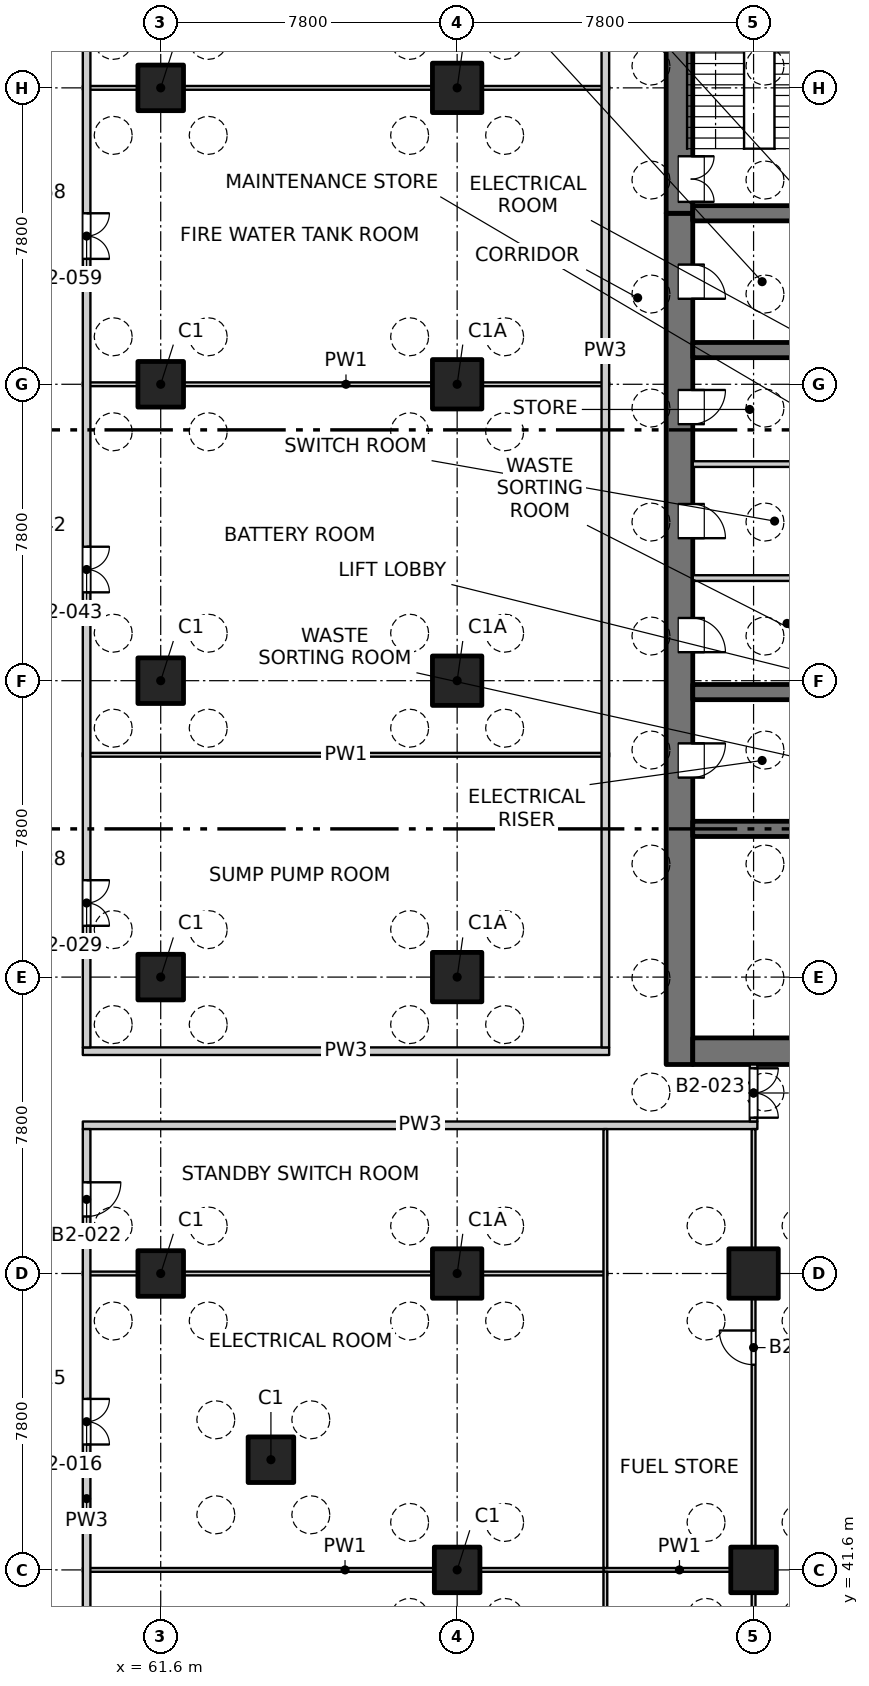
"""IFC4 building model, lengths in metres.
Left out: names, types, materials, properties, quantities, classifications, styles, units other than length and angle.
Written with IfcOpenShell. Run it as: python <this file> out.ifc"""

import sys

from ifc_helpers import new_model, si_unit, direction, frame, frame_2d, origin, origin_2d, place, context, subcontext, project, spatial, rectangle, extrude, element, fill, save


model = new_model("IFC4")
c1 = context("Model", 3, precision=1e-05, world=origin(), true_north=direction((0.0, 1.0)))
c2 = subcontext(c1, "Body", "Model", "MODEL_VIEW")
j1 = project(units=[si_unit("LENGTHUNIT", "METRE"), si_unit("PLANEANGLEUNIT", "RADIAN")], contexts=[c1])
p1 = place(None, origin())
s1 = spatial("IfcSite", under=j1, at=p1, CompositionType="ELEMENT")
p2 = place(p1, origin())
s2 = spatial("IfcBuilding", under=s1, at=p2, CompositionType="ELEMENT")
p3 = place(p2, frame((0.0, 0.0, -9.0)))
s3 = spatial("IfcBuildingStorey", under=s2, at=p3, CompositionType="ELEMENT", Elevation=-9.0)
for number, where, z_axis, x_axis in (
    (1, (64.5, 44.5, -0.5), (0.0, 0.0, 1.0), (1.0, 0.0, 0.0)),
    (2, (61.6, 49.4, -0.5), (0.0, 0.0, 1.0), (1.0, 0.0, 0.0)),
    (3, (69.4, 41.6, -0.5), (0.0, 0.0, 1.0), (1.0, 0.0, 0.0)),
    (4, (61.6, 57.2, -0.5), (0.0, 0.0, 1.0), (1.0, 0.0, 0.0)),
    (5, (77.2, 41.6, -0.5), (0.0, 0.0, 1.0), (1.0, 0.0, 0.0)),
    (6, (61.6, 65.0, -0.5), (0.0, 0.0, 1.0), (1.0, 0.0, 0.0)),
    (7, (61.6, 72.8, -0.5), (0.0, 0.0, 1.0), (1.0, 0.0, 0.0)),
    (8, (61.6, 80.6, -0.5), (0.0, 0.0, 1.0), (1.0, 0.0, 0.0)),
):
    element("IfcColumn", number, at=place(p3, frame(where, z_axis=z_axis, x_axis=x_axis)), inside=s3, PredefinedType="COLUMN", context=c2, shape_type="SweptSolid", body=[
        extrude(rectangle(XDim=1.2, YDim=1.2, at=origin_2d()), origin(), (0.0, 0.0, 1.0), 4.65),
    ])
for number, where, z_axis, x_axis in (
    (9, (69.4, 49.4, -0.5), (0.0, 0.0, 1.0), (1.0, 0.0, 0.0)),
    (10, (69.4, 57.2, -0.5), (0.0, 0.0, 1.0), (1.0, 0.0, 0.0)),
    (11, (69.4, 65.0, -0.5), (0.0, 0.0, 1.0), (1.0, 0.0, 0.0)),
    (12, (69.4, 72.8, -0.5), (0.0, 0.0, 1.0), (1.0, 0.0, 0.0)),
    (13, (69.4, 80.6, -0.5), (0.0, 0.0, 1.0), (1.0, 0.0, 0.0)),
    (14, (77.2, 49.4, -0.5), (0.0, 0.0, 1.0), (1.0, 0.0, 0.0)),
):
    element("IfcColumn", number, at=place(p3, frame(where, z_axis=z_axis, x_axis=x_axis)), inside=s3, PredefinedType="COLUMN", context=c2, shape_type="SweptSolid", body=[
        extrude(rectangle(XDim=1.3, YDim=1.3, at=origin_2d()), origin(), (0.0, 0.0, 1.0), 4.65),
    ])
p4 = place(p3, frame((75.25, 54.9, -0.5), z_axis=(0.0, 0.0, 1.0), x_axis=(0.0, 1.0, 0.0)))
e15 = element("IfcWall", 15, at=p4, inside=s3, PredefinedType="SOLIDWALL", context=c2, shape_type="SweptSolid", body=[
    extrude(rectangle(XDim=22.4, YDim=0.7, at=frame_2d((11.2, 0.0))), origin(), (0.0, 0.0, 1.0), 4.65),
])
p5 = place(p4, frame((7.55, 0.0, 0.5)))
e16 = element("IfcOpeningElement", 16, at=p5, cuts=e15, PredefinedType="OPENING", context=c2, shape_type="SweptSolid", body=[
    extrude(rectangle(XDim=0.9, YDim=2.1, at=frame_2d((0.45, 1.05))), frame((0.0, 0.36, 0.0), z_axis=(0.0, -1.0, 0.0), x_axis=(1.0, 0.0, 0.0)), (0.0, 0.0, 1.0), 0.72),
])
p6 = place(p4, frame((10.85, 0.0, 0.5)))
e17 = element("IfcOpeningElement", 17, at=p6, cuts=e15, PredefinedType="OPENING", context=c2, shape_type="SweptSolid", body=[
    extrude(rectangle(XDim=0.9, YDim=2.1, at=frame_2d((0.45, 1.05))), frame((0.0, 0.36, 0.0), z_axis=(0.0, -1.0, 0.0), x_axis=(1.0, 0.0, 0.0)), (0.0, 0.0, 1.0), 0.72),
])
p7 = place(p4, frame((13.85, 0.0, 0.5)))
e18 = element("IfcOpeningElement", 18, at=p7, cuts=e15, PredefinedType="OPENING", context=c2, shape_type="SweptSolid", body=[
    extrude(rectangle(XDim=0.9, YDim=2.1, at=frame_2d((0.45, 1.05))), frame((0.0, 0.36, 0.0), z_axis=(0.0, -1.0, 0.0), x_axis=(1.0, 0.0, 0.0)), (0.0, 0.0, 1.0), 0.72),
])
p8 = place(p4, frame((16.85, 0.0, 0.5)))
e19 = element("IfcOpeningElement", 19, at=p8, cuts=e15, PredefinedType="OPENING", context=c2, shape_type="SweptSolid", body=[
    extrude(rectangle(XDim=0.9, YDim=2.1, at=frame_2d((0.45, 1.05))), frame((0.0, 0.36, 0.0), z_axis=(0.0, -1.0, 0.0), x_axis=(1.0, 0.0, 0.0)), (0.0, 0.0, 1.0), 0.72),
])
p9 = place(p4, frame((20.15, 0.0, 0.5)))
e20 = element("IfcOpeningElement", 20, at=p9, cuts=e15, PredefinedType="OPENING", context=c2, shape_type="SweptSolid", body=[
    extrude(rectangle(XDim=0.9, YDim=2.1, at=frame_2d((0.45, 1.05))), frame((0.0, 0.36, 0.0), z_axis=(0.0, -1.0, 0.0), x_axis=(1.0, 0.0, 0.0)), (0.0, 0.0, 1.0), 0.72),
])
p10 = place(p3, frame((75.25, 77.3, -0.5), z_axis=(0.0, 0.0, 1.0), x_axis=(0.0, 1.0, 0.0)))
e21 = element("IfcWall", 21, at=p10, inside=s3, PredefinedType="SOLIDWALL", context=c2, shape_type="SweptSolid", body=[
    extrude(rectangle(XDim=7.55, YDim=0.7, at=frame_2d((3.775, 0.0))), origin(), (0.0, 0.0, 1.0), 4.65),
])
p11 = place(p10, frame((0.3, 0.0, 0.5)))
e22 = element("IfcOpeningElement", 22, at=p11, cuts=e21, PredefinedType="OPENING", context=c2, shape_type="SweptSolid", body=[
    extrude(rectangle(XDim=1.2, YDim=2.1, at=frame_2d((0.6, 1.05))), frame((0.0, 0.36, 0.0), z_axis=(0.0, -1.0, 0.0), x_axis=(1.0, 0.0, 0.0)), (0.0, 0.0, 1.0), 0.72),
])
p12 = place(p3, frame((75.6, 55.25, -0.5), z_axis=(0.0, 0.0, 1.0), x_axis=(1.0, 0.0, 0.0)))
e23 = element("IfcWall", 23, at=p12, inside=s3, PredefinedType="SOLIDWALL", context=c2, shape_type="SweptSolid", body=[
    extrude(rectangle(XDim=18.8, YDim=0.7, at=frame_2d((9.4, 0.0))), origin(), (0.0, 0.0, 1.0), 4.65),
])
p13 = place(p12, frame((8.65, 0.0, 0.5)))
e24 = element("IfcOpeningElement", 24, at=p13, cuts=e23, PredefinedType="OPENING", context=c2, shape_type="SweptSolid", body=[
    extrude(rectangle(XDim=1.5, YDim=2.1, at=frame_2d((0.75, 1.05))), frame((0.0, 0.36, 0.0), z_axis=(0.0, -1.0, 0.0), x_axis=(1.0, 0.0, 0.0)), (0.0, 0.0, 1.0), 0.72),
])
for number, where, z_axis, x_axis in (
    (25, (75.6, 61.1, -0.5), (0.0, 0.0, 1.0), (1.0, 0.0, 0.0)),
    (26, (75.6, 64.7, -0.5), (0.0, 0.0, 1.0), (1.0, 0.0, 0.0)),
    (27, (75.6, 73.7, -0.5), (0.0, 0.0, 1.0), (1.0, 0.0, 0.0)),
    (28, (75.6, 77.3, -0.5), (0.0, 0.0, 1.0), (1.0, 0.0, 0.0)),
):
    element("IfcWall", number, at=place(p3, frame(where, z_axis=z_axis, x_axis=x_axis)), inside=s3, PredefinedType="SOLIDWALL", context=c2, shape_type="SweptSolid", body=[
        extrude(rectangle(XDim=3.65, YDim=0.4, at=frame_2d((1.825, 0.0))), origin(), (0.0, 0.0, 1.0), 4.65),
    ])
p14 = place(p3, frame((59.55, 41.6, 0.0), z_axis=(0.0, 0.0, 1.0), x_axis=(1.0, 0.0, 0.0)))
e29 = element("IfcWall", 29, at=p14, inside=s3, PredefinedType="PARTITIONING", context=c2, shape_type="SweptSolid", body=[
    extrude(rectangle(XDim=13.8, YDim=0.1, at=frame_2d((6.9, 0.0))), origin(), (0.0, 0.0, 1.0), 4.15),
])
p15 = place(p3, frame((73.25, 41.6, 0.0), z_axis=(0.0, 0.0, 1.0), x_axis=(1.0, 0.0, 0.0)))
e30 = element("IfcWall", 30, at=p15, inside=s3, PredefinedType="PARTITIONING", context=c2, shape_type="SweptSolid", body=[
    extrude(rectangle(XDim=4.0, YDim=0.1, at=frame_2d((2.0, 0.0))), origin(), (0.0, 0.0, 1.0), 4.15),
])
p16 = place(p3, frame((59.55, 49.4, 0.0), z_axis=(0.0, 0.0, 1.0), x_axis=(1.0, 0.0, 0.0)))
e31 = element("IfcWall", 31, at=p16, inside=s3, PredefinedType="PARTITIONING", context=c2, shape_type="SweptSolid", body=[
    extrude(rectangle(XDim=13.8, YDim=0.1, at=frame_2d((6.9, 0.0))), origin(), (0.0, 0.0, 1.0), 4.15),
])
p17 = place(p3, frame((59.55, 53.3, 0.0), z_axis=(0.0, 0.0, 1.0), x_axis=(1.0, 0.0, 0.0)))
e32 = element("IfcWall", 32, at=p17, inside=s3, PredefinedType="PARTITIONING", context=c2, shape_type="SweptSolid", body=[
    extrude(rectangle(XDim=17.75, YDim=0.2, at=frame_2d((8.875, 0.0))), origin(), (0.0, 0.0, 1.0), 4.15),
])
p18 = place(p3, frame((59.55, 55.25, 0.0), z_axis=(0.0, 0.0, 1.0), x_axis=(1.0, 0.0, 0.0)))
e33 = element("IfcWall", 33, at=p18, inside=s3, PredefinedType="PARTITIONING", context=c2, shape_type="SweptSolid", body=[
    extrude(rectangle(XDim=13.85, YDim=0.2, at=frame_2d((6.925, 0.0))), origin(), (0.0, 0.0, 1.0), 4.15),
])
p19 = place(p3, frame((59.55, 63.05, 0.0), z_axis=(0.0, 0.0, 1.0), x_axis=(1.0, 0.0, 0.0)))
e34 = element("IfcWall", 34, at=p19, inside=s3, PredefinedType="PARTITIONING", context=c2, shape_type="SweptSolid", body=[
    extrude(rectangle(XDim=13.85, YDim=0.1, at=frame_2d((6.925, 0.0))), origin(), (0.0, 0.0, 1.0), 4.15),
])
for number, where, z_axis, x_axis in (
    (35, (75.6, 67.7, 0.0), (0.0, 0.0, 1.0), (1.0, 0.0, 0.0)),
    (36, (75.6, 70.7, 0.0), (0.0, 0.0, 1.0), (1.0, 0.0, 0.0)),
):
    element("IfcWall", number, at=place(p3, frame(where, z_axis=z_axis, x_axis=x_axis)), inside=s3, PredefinedType="PARTITIONING", context=c2, shape_type="SweptSolid", body=[
        extrude(rectangle(XDim=3.65, YDim=0.15, at=frame_2d((1.825, 0.0))), origin(), (0.0, 0.0, 1.0), 4.15),
    ])
for number, where, z_axis, x_axis in (
    (37, (59.55, 72.8, 0.0), (0.0, 0.0, 1.0), (1.0, 0.0, 0.0)),
    (38, (59.55, 80.6, 0.0), (0.0, 0.0, 1.0), (1.0, 0.0, 0.0)),
):
    element("IfcWall", number, at=place(p3, frame(where, z_axis=z_axis, x_axis=x_axis)), inside=s3, PredefinedType="PARTITIONING", context=c2, shape_type="SweptSolid", body=[
        extrude(rectangle(XDim=13.85, YDim=0.1, at=frame_2d((6.925, 0.0))), origin(), (0.0, 0.0, 1.0), 4.15),
    ])
p20 = place(p3, frame((59.65, 33.75, 0.0), z_axis=(0.0, 0.0, 1.0), x_axis=(0.0, 1.0, 0.0)))
e39 = element("IfcWall", 39, at=p20, inside=s3, PredefinedType="PARTITIONING", context=c2, shape_type="SweptSolid", body=[
    extrude(rectangle(XDim=19.45, YDim=0.2, at=frame_2d((9.725, 0.0))), origin(), (0.0, 0.0, 1.0), 4.15),
])
p21 = place(p20, frame((3.35, 0.0, 0.0)))
e40 = element("IfcOpeningElement", 40, at=p21, cuts=e39, PredefinedType="OPENING", context=c2, shape_type="SweptSolid", body=[
    extrude(rectangle(XDim=1.2, YDim=2.1, at=frame_2d((0.6, 1.05))), frame((0.0, 0.11, 0.0), z_axis=(0.0, -1.0, 0.0), x_axis=(1.0, 0.0, 0.0)), (0.0, 0.0, 1.0), 0.22),
])
p22 = place(p20, frame((11.15, 0.0, 0.0)))
e41 = element("IfcOpeningElement", 41, at=p22, cuts=e39, PredefinedType="OPENING", context=c2, shape_type="SweptSolid", body=[
    extrude(rectangle(XDim=1.2, YDim=2.1, at=frame_2d((0.6, 1.05))), frame((0.0, 0.11, 0.0), z_axis=(0.0, -1.0, 0.0), x_axis=(1.0, 0.0, 0.0)), (0.0, 0.0, 1.0), 0.22),
])
p23 = place(p20, frame((17.15, 0.0, 0.0)))
e42 = element("IfcOpeningElement", 42, at=p23, cuts=e39, PredefinedType="OPENING", context=c2, shape_type="SweptSolid", body=[
    extrude(rectangle(XDim=0.9, YDim=2.1, at=frame_2d((0.45, 1.05))), frame((0.0, 0.11, 0.0), z_axis=(0.0, -1.0, 0.0), x_axis=(1.0, 0.0, 0.0)), (0.0, 0.0, 1.0), 0.22),
])
p24 = place(p3, frame((59.65, 55.35, 0.0), z_axis=(0.0, 0.0, 1.0), x_axis=(0.0, 1.0, 0.0)))
e43 = element("IfcWall", 43, at=p24, inside=s3, PredefinedType="PARTITIONING", context=c2, shape_type="SweptSolid", body=[
    extrude(rectangle(XDim=36.65, YDim=0.2, at=frame_2d((18.325, 0.0))), origin(), (0.0, 0.0, 1.0), 4.15),
])
p25 = place(p24, frame((3.2, 0.0, 0.0)))
e44 = element("IfcOpeningElement", 44, at=p25, cuts=e43, PredefinedType="OPENING", context=c2, shape_type="SweptSolid", body=[
    extrude(rectangle(XDim=1.2, YDim=2.1, at=frame_2d((0.6, 1.05))), frame((0.0, 0.11, 0.0), z_axis=(0.0, -1.0, 0.0), x_axis=(1.0, 0.0, 0.0)), (0.0, 0.0, 1.0), 0.22),
])
p26 = place(p24, frame((11.975, 0.0, 0.0)))
e45 = element("IfcOpeningElement", 45, at=p26, cuts=e43, PredefinedType="OPENING", context=c2, shape_type="SweptSolid", body=[
    extrude(rectangle(XDim=1.2, YDim=2.1, at=frame_2d((0.6, 1.05))), frame((0.0, 0.11, 0.0), z_axis=(0.0, -1.0, 0.0), x_axis=(1.0, 0.0, 0.0)), (0.0, 0.0, 1.0), 0.22),
])
p27 = place(p24, frame((20.75, 0.0, 0.0)))
e46 = element("IfcOpeningElement", 46, at=p27, cuts=e43, PredefinedType="OPENING", context=c2, shape_type="SweptSolid", body=[
    extrude(rectangle(XDim=1.2, YDim=2.1, at=frame_2d((0.6, 1.05))), frame((0.0, 0.11, 0.0), z_axis=(0.0, -1.0, 0.0), x_axis=(1.0, 0.0, 0.0)), (0.0, 0.0, 1.0), 0.22),
])
p28 = place(p24, frame((30.5, 0.0, 0.0)))
e47 = element("IfcOpeningElement", 47, at=p28, cuts=e43, PredefinedType="OPENING", context=c2, shape_type="SweptSolid", body=[
    extrude(rectangle(XDim=1.2, YDim=2.1, at=frame_2d((0.6, 1.05))), frame((0.0, 0.11, 0.0), z_axis=(0.0, -1.0, 0.0), x_axis=(1.0, 0.0, 0.0)), (0.0, 0.0, 1.0), 0.22),
])
p29 = place(p3, frame((73.3, 33.85, 0.0), z_axis=(0.0, 0.0, 1.0), x_axis=(0.0, 1.0, 0.0)))
e48 = element("IfcWall", 48, at=p29, inside=s3, PredefinedType="PARTITIONING", context=c2, shape_type="SweptSolid", body=[
    extrude(rectangle(XDim=7.7, YDim=0.1, at=frame_2d((3.85, 0.0))), origin(), (0.0, 0.0, 1.0), 4.15),
])
p30 = place(p3, frame((73.3, 41.65, 0.0), z_axis=(0.0, 0.0, 1.0), x_axis=(0.0, 1.0, 0.0)))
e49 = element("IfcWall", 49, at=p30, inside=s3, PredefinedType="PARTITIONING", context=c2, shape_type="SweptSolid", body=[
    extrude(rectangle(XDim=11.55, YDim=0.1, at=frame_2d((5.775, 0.0))), origin(), (0.0, 0.0, 1.0), 4.15),
])
p31 = place(p3, frame((73.3, 55.35, 0.0), z_axis=(0.0, 0.0, 1.0), x_axis=(0.0, 1.0, 0.0)))
e50 = element("IfcWall", 50, at=p31, inside=s3, PredefinedType="PARTITIONING", context=c2, shape_type="SweptSolid", body=[
    extrude(rectangle(XDim=36.65, YDim=0.2, at=frame_2d((18.325, 0.0))), origin(), (0.0, 0.0, 1.0), 4.15),
])
p32 = place(p3, frame((77.2, 22.4, 0.0), z_axis=(0.0, 0.0, 1.0), x_axis=(0.0, 1.0, 0.0)))
e51 = element("IfcWall", 51, at=p32, inside=s3, PredefinedType="PARTITIONING", context=c2, shape_type="SweptSolid", body=[
    extrude(rectangle(XDim=19.15, YDim=0.1, at=frame_2d((9.575, 0.0))), origin(), (0.0, 0.0, 1.0), 4.15),
])
p33 = place(p32, frame((9.65, 0.0, 0.0)))
e52 = element("IfcOpeningElement", 52, at=p33, cuts=e51, PredefinedType="OPENING", context=c2, shape_type="SweptSolid", body=[
    extrude(rectangle(XDim=0.9, YDim=2.1, at=frame_2d((0.45, 1.05))), frame((0.0, 0.06, 0.0), z_axis=(0.0, -1.0, 0.0), x_axis=(1.0, 0.0, 0.0)), (0.0, 0.0, 1.0), 0.12),
])
p34 = place(p32, frame((14.85, 0.0, 0.0)))
e53 = element("IfcOpeningElement", 53, at=p34, cuts=e51, PredefinedType="OPENING", context=c2, shape_type="SweptSolid", body=[
    extrude(rectangle(XDim=0.9, YDim=2.1, at=frame_2d((0.45, 1.05))), frame((0.0, 0.06, 0.0), z_axis=(0.0, -1.0, 0.0), x_axis=(1.0, 0.0, 0.0)), (0.0, 0.0, 1.0), 0.12),
])
p35 = place(p3, frame((77.2, 41.65, 0.0), z_axis=(0.0, 0.0, 1.0), x_axis=(0.0, 1.0, 0.0)))
e54 = element("IfcWall", 54, at=p35, inside=s3, PredefinedType="PARTITIONING", context=c2, shape_type="SweptSolid", body=[
    extrude(rectangle(XDim=11.55, YDim=0.1, at=frame_2d((5.775, 0.0))), origin(), (0.0, 0.0, 1.0), 4.15),
])
p36 = place(p35, frame((5.35, 0.0, 0.0)))
e55 = element("IfcOpeningElement", 55, at=p36, cuts=e54, PredefinedType="OPENING", context=c2, shape_type="SweptSolid", body=[
    extrude(rectangle(XDim=0.9, YDim=2.1, at=frame_2d((0.45, 1.05))), frame((0.0, 0.06, 0.0), z_axis=(0.0, -1.0, 0.0), x_axis=(1.0, 0.0, 0.0)), (0.0, 0.0, 1.0), 0.12),
])
p37 = place(p3, frame((77.2, 53.4, 0.0), z_axis=(0.0, 0.0, 1.0), x_axis=(0.0, 1.0, 0.0)))
e56 = element("IfcWall", 56, at=p37, inside=s3, PredefinedType="PARTITIONING", context=c2, shape_type="SweptSolid", body=[
    extrude(rectangle(XDim=1.5, YDim=0.2, at=frame_2d((0.75, 0.0))), origin(), (0.0, 0.0, 1.0), 4.15),
])
p38 = place(p37, frame((0.1, 0.0, 0.0)))
e57 = element("IfcOpeningElement", 57, at=p38, cuts=e56, PredefinedType="OPENING", context=c2, shape_type="SweptSolid", body=[
    extrude(rectangle(XDim=1.3, YDim=2.1, at=frame_2d((0.65, 1.05))), frame((0.0, 0.11, 0.0), z_axis=(0.0, -1.0, 0.0), x_axis=(1.0, 0.0, 0.0)), (0.0, 0.0, 1.0), 0.22),
])
p39 = place(p22, origin())
e58 = element("IfcDoor", 58, at=p39, inside=s3, OperationType="DOUBLE_DOOR_SINGLE_SWING", PredefinedType="DOOR", context=c2, shape_type="SweptSolid", body=[
    extrude(rectangle(XDim=1.2, YDim=2.1, at=frame_2d((0.6, 1.05))), frame((0.0, 0.025, 0.0), z_axis=(0.0, -1.0, 0.0), x_axis=(1.0, 0.0, 0.0)), (0.0, 0.0, 1.0), 0.05),
])
fill(e41, e58)
p40 = place(p36, origin())
e59 = element("IfcDoor", 59, at=p40, inside=s3, OperationType="SINGLE_SWING_RIGHT", PredefinedType="DOOR", context=c2, shape_type="SweptSolid", body=[
    extrude(rectangle(XDim=0.9, YDim=2.1, at=frame_2d((0.45, 1.05))), frame((0.0, 0.025, 0.0), z_axis=(0.0, -1.0, 0.0), x_axis=(1.0, 0.0, 0.0)), (0.0, 0.0, 1.0), 0.05),
])
fill(e55, e59)
p41 = place(p23, origin())
e60 = element("IfcDoor", 60, at=p41, inside=s3, OperationType="SINGLE_SWING_LEFT", PredefinedType="DOOR", context=c2, shape_type="SweptSolid", body=[
    extrude(rectangle(XDim=0.9, YDim=2.1, at=frame_2d((0.45, 1.05))), frame((0.0, 0.025, 0.0), z_axis=(0.0, -1.0, 0.0), x_axis=(1.0, 0.0, 0.0)), (0.0, 0.0, 1.0), 0.05),
])
fill(e42, e60)
p42 = place(p38, origin())
e61 = element("IfcDoor", 61, at=p42, inside=s3, OperationType="DOUBLE_DOOR_SINGLE_SWING", PredefinedType="DOOR", context=c2, shape_type="SweptSolid", body=[
    extrude(rectangle(XDim=1.3, YDim=2.1, at=frame_2d((0.65, 1.05))), frame((0.0, 0.025, 0.0), z_axis=(0.0, -1.0, 0.0), x_axis=(1.0, 0.0, 0.0)), (0.0, 0.0, 1.0), 0.05),
])
fill(e57, e61)
p43 = place(p25, origin())
e62 = element("IfcDoor", 62, at=p43, inside=s3, OperationType="DOUBLE_DOOR_SINGLE_SWING", PredefinedType="DOOR", context=c2, shape_type="SweptSolid", body=[
    extrude(rectangle(XDim=1.2, YDim=2.1, at=frame_2d((0.6, 1.05))), frame((0.0, 0.025, 0.0), z_axis=(0.0, -1.0, 0.0), x_axis=(1.0, 0.0, 0.0)), (0.0, 0.0, 1.0), 0.05),
])
fill(e44, e62)
p44 = place(p5, origin())
e63 = element("IfcDoor", 63, at=p44, inside=s3, OperationType="SINGLE_SWING_LEFT", PredefinedType="DOOR", context=c2, shape_type="SweptSolid", body=[
    extrude(rectangle(XDim=0.9, YDim=2.1, at=frame_2d((0.45, 1.05))), frame((0.0, -0.285, 0.0), z_axis=(0.0, -1.0, 0.0), x_axis=(1.0, 0.0, 0.0)), (0.0, 0.0, 1.0), 0.05),
])
fill(e16, e63)
p45 = place(p6, origin())
e64 = element("IfcDoor", 64, at=p45, inside=s3, OperationType="SINGLE_SWING_RIGHT", PredefinedType="DOOR", context=c2, shape_type="SweptSolid", body=[
    extrude(rectangle(XDim=0.9, YDim=2.1, at=frame_2d((0.45, 1.05))), frame((0.0, -0.285, 0.0), z_axis=(0.0, -1.0, 0.0), x_axis=(1.0, 0.0, 0.0)), (0.0, 0.0, 1.0), 0.05),
])
fill(e17, e64)
p46 = place(p26, origin())
e65 = element("IfcDoor", 65, at=p46, inside=s3, OperationType="DOUBLE_DOOR_SINGLE_SWING", PredefinedType="DOOR", context=c2, shape_type="SweptSolid", body=[
    extrude(rectangle(XDim=1.2, YDim=2.1, at=frame_2d((0.6, 1.05))), frame((0.0, 0.025, 0.0), z_axis=(0.0, -1.0, 0.0), x_axis=(1.0, 0.0, 0.0)), (0.0, 0.0, 1.0), 0.05),
])
fill(e45, e65)
p47 = place(p7, origin())
e66 = element("IfcDoor", 66, at=p47, inside=s3, OperationType="SINGLE_SWING_RIGHT", PredefinedType="DOOR", context=c2, shape_type="SweptSolid", body=[
    extrude(rectangle(XDim=0.9, YDim=2.1, at=frame_2d((0.45, 1.05))), frame((0.0, -0.285, 0.0), z_axis=(0.0, -1.0, 0.0), x_axis=(1.0, 0.0, 0.0)), (0.0, 0.0, 1.0), 0.05),
])
fill(e18, e66)
p48 = place(p8, origin())
e67 = element("IfcDoor", 67, at=p48, inside=s3, OperationType="SINGLE_SWING_LEFT", PredefinedType="DOOR", context=c2, shape_type="SweptSolid", body=[
    extrude(rectangle(XDim=0.9, YDim=2.1, at=frame_2d((0.45, 1.05))), frame((0.0, -0.285, 0.0), z_axis=(0.0, -1.0, 0.0), x_axis=(1.0, 0.0, 0.0)), (0.0, 0.0, 1.0), 0.05),
])
fill(e19, e67)
p49 = place(p9, origin())
e68 = element("IfcDoor", 68, at=p49, inside=s3, OperationType="SINGLE_SWING_RIGHT", PredefinedType="DOOR", context=c2, shape_type="SweptSolid", body=[
    extrude(rectangle(XDim=0.9, YDim=2.1, at=frame_2d((0.45, 1.05))), frame((0.0, -0.285, 0.0), z_axis=(0.0, -1.0, 0.0), x_axis=(1.0, 0.0, 0.0)), (0.0, 0.0, 1.0), 0.05),
])
fill(e20, e68)
p50 = place(p27, origin())
e69 = element("IfcDoor", 69, at=p50, inside=s3, OperationType="DOUBLE_DOOR_SINGLE_SWING", PredefinedType="DOOR", context=c2, shape_type="SweptSolid", body=[
    extrude(rectangle(XDim=1.2, YDim=2.1, at=frame_2d((0.6, 1.05))), frame((0.0, 0.025, 0.0), z_axis=(0.0, -1.0, 0.0), x_axis=(1.0, 0.0, 0.0)), (0.0, 0.0, 1.0), 0.05),
])
fill(e46, e69)
p51 = place(p11, origin())
e70 = element("IfcDoor", 70, at=p51, inside=s3, OperationType="DOUBLE_DOOR_SINGLE_SWING", PredefinedType="DOOR", context=c2, shape_type="SweptSolid", body=[
    extrude(rectangle(XDim=1.2, YDim=2.1, at=frame_2d((0.6, 1.05))), frame((0.0, -0.285, 0.0), z_axis=(0.0, -1.0, 0.0), x_axis=(1.0, 0.0, 0.0)), (0.0, 0.0, 1.0), 0.05),
])
fill(e22, e70)
save(model, sys.argv[1])
